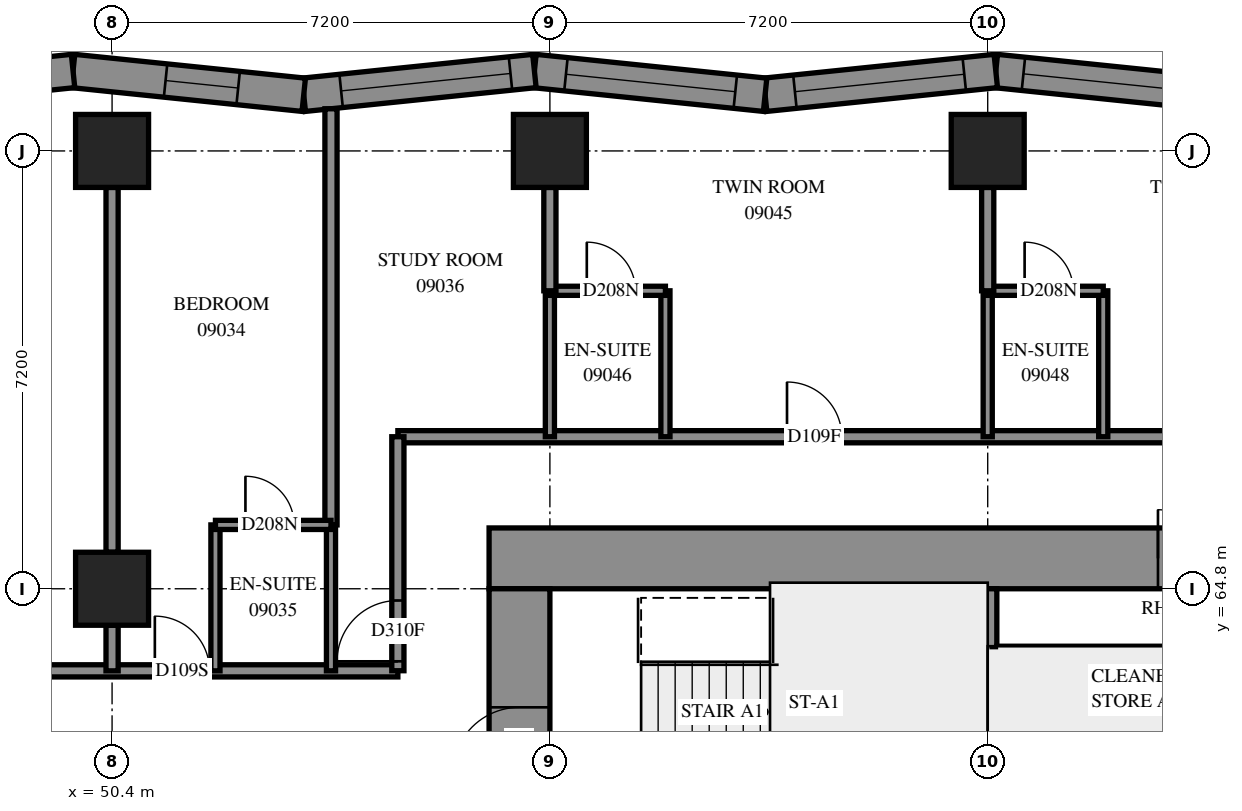
"""IFC4 building model, lengths in metres.
Left out: names, types, materials, properties, quantities, classifications, styles, units other than length and angle.
Written with IfcOpenShell. Run it as: python <this file> out.ifc"""

import sys

from ifc_helpers import new_model, si_unit, direction, frame, frame_2d, origin, origin_2d, place, context, subcontext, project, spatial, polyline, rectangle, outline, extrude, element, fill, save


model = new_model("IFC4")
c1 = context("Model", 3, precision=1e-05, world=origin(), true_north=direction((0.0, 1.0)))
c2 = subcontext(c1, "Body", "Model", "MODEL_VIEW")
j1 = project(units=[si_unit("LENGTHUNIT", "METRE"), si_unit("PLANEANGLEUNIT", "RADIAN")], contexts=[c1])
p1 = place(None, origin())
s1 = spatial("IfcSite", under=j1, at=p1, CompositionType="ELEMENT")
p2 = place(p1, origin())
s2 = spatial("IfcBuilding", under=s1, at=p2, CompositionType="ELEMENT")
p3 = place(p2, frame((0.0, 0.0, 37.2)))
s3 = spatial("IfcBuildingStorey", under=s2, at=p3, CompositionType="ELEMENT", Elevation=37.2)
for number, where, z_axis, x_axis in (
    (1, (50.4, 64.8, 0.0), (0.0, 0.0, 1.0), (1.0, 0.0, 0.0)),
    (2, (50.4, 72.0, 0.0), (0.0, 0.0, 1.0), (1.0, 0.0, 0.0)),
    (3, (57.6, 72.0, 0.0), (0.0, 0.0, 1.0), (1.0, 0.0, 0.0)),
    (4, (64.8, 72.0, 0.0), (0.0, 0.0, 1.0), (1.0, 0.0, 0.0)),
):
    element("IfcColumn", number, at=place(p3, frame(where, z_axis=z_axis, x_axis=x_axis)), inside=s3, PredefinedType="COLUMN", context=c2, shape_type="SweptSolid", body=[
        extrude(rectangle(XDim=1.2, YDim=1.2, at=origin_2d()), origin(), (0.0, 0.0, 1.0), 3.1),
    ])
p4 = place(p3, frame((56.6, 65.3, -0.3), z_axis=(0.0, 0.0, 1.0), x_axis=(1.0, 0.0, 0.0)))
e5 = element("IfcWall", 5, at=p4, inside=s3, PredefinedType="SHEAR", context=c2, shape_type="SweptSolid", body=[
    extrude(rectangle(XDim=16.4, YDim=1.0, at=frame_2d((8.2, 0.0))), origin(), (0.0, 0.0, 1.0), 2.7),
])
p5 = place(p4, frame((11.0, 0.0, 0.3)))
e6 = element("IfcOpeningElement", 6, at=p5, cuts=e5, PredefinedType="OPENING", context=c2, shape_type="SweptSolid", body=[
    extrude(rectangle(XDim=0.8, YDim=2.1, at=frame_2d((0.4, 1.05))), frame((0.0, 0.51, 0.0), z_axis=(0.0, -1.0, 0.0), x_axis=(1.0, 0.0, 0.0)), (0.0, 0.0, 1.0), 1.02),
])
p6 = place(p3, frame((57.1, 50.4, -0.3), z_axis=(0.0, 0.0, 1.0), x_axis=(0.0, 1.0, 0.0)))
e7 = element("IfcWall", 7, at=p6, inside=s3, PredefinedType="SHEAR", context=c2, shape_type="SweptSolid", body=[
    extrude(rectangle(XDim=14.4, YDim=1.0, at=frame_2d((7.2, 0.0))), origin(), (0.0, 0.0, 1.0), 2.7),
])
p7 = place(p6, frame((4.55, 0.0, 0.3)))
e8 = element("IfcOpeningElement", 8, at=p7, cuts=e7, PredefinedType="OPENING", context=c2, shape_type="SweptSolid", body=[
    extrude(rectangle(XDim=1.1, YDim=2.1, at=frame_2d((0.55, 1.05))), frame((0.0, 0.51, 0.0), z_axis=(0.0, -1.0, 0.0), x_axis=(1.0, 0.0, 0.0)), (0.0, 0.0, 1.0), 1.02),
])
p8 = place(p6, frame((11.35, 0.0, 0.3)))
e9 = element("IfcOpeningElement", 9, at=p8, cuts=e7, PredefinedType="OPENING", context=c2, shape_type="SweptSolid", body=[
    extrude(rectangle(XDim=1.1, YDim=2.1, at=frame_2d((0.55, 1.05))), frame((0.0, 0.51, 0.0), z_axis=(0.0, -1.0, 0.0), x_axis=(1.0, 0.0, 0.0)), (0.0, 0.0, 1.0), 1.02),
])
p9 = place(p3, frame((64.8, 60.6, 0.0), z_axis=(0.0, 0.0, 1.0), x_axis=(0.0, 1.0, 0.0)))
e10 = element("IfcWall", 10, at=p9, inside=s3, PredefinedType="SOLIDWALL", context=c2, shape_type="SweptSolid", body=[
    extrude(rectangle(XDim=4.2, YDim=0.3, at=frame_2d((2.1, 0.0))), origin(), (0.0, 0.0, 1.0), 3.1),
])
p10 = place(p3, frame((68.727, 72.924, 0.0), z_axis=(0.0, 0.0, 1.0), x_axis=(-0.9947306832, 0.1025225234, 0.0)))
e11 = element("IfcWall", 11, at=p10, inside=s3, PredefinedType="SOLIDWALL", context=c2, shape_type="SweptSolid", body=[
    extrude(outline(polyline([(0.028, -0.275), (3.842, -0.275), (3.785, 0.275), (-0.028, 0.275), (0.028, -0.275)])), origin(), (0.0, 0.0, 1.0), 3.1),
])
p11 = place(p10, frame((0.557, 0.0, 0.5)))
e12 = element("IfcOpeningElement", 12, at=p11, cuts=e11, PredefinedType="OPENING", context=c2, shape_type="SweptSolid", body=[
    extrude(rectangle(XDim=2.8, YDim=2.45, at=frame_2d((1.4, 1.225))), frame((0.0, 0.285, 0.0), z_axis=(0.0, -1.0, 0.0), x_axis=(1.0, 0.0, 0.0)), (0.0, 0.0, 1.0), 0.57),
])
p12 = place(p3, frame((64.933, 73.314, 0.0), z_axis=(0.0, 0.0, 1.0), x_axis=(-0.9947304076, -0.1025251975, 0.0)))
e13 = element("IfcWall", 13, at=p12, inside=s3, PredefinedType="SOLIDWALL", context=c2, shape_type="SweptSolid", body=[
    extrude(outline(polyline([(-0.028, -0.275), (3.785, -0.275), (3.842, 0.275), (0.028, 0.275), (-0.028, -0.275)])), origin(), (0.0, 0.0, 1.0), 3.1),
])
p13 = place(p12, frame((0.521, 0.0, 0.5)))
e14 = element("IfcOpeningElement", 14, at=p13, cuts=e13, PredefinedType="OPENING", context=c2, shape_type="SweptSolid", body=[
    extrude(rectangle(XDim=2.8, YDim=2.45, at=frame_2d((1.4, 1.225))), frame((0.0, 0.285, 0.0), z_axis=(0.0, -1.0, 0.0), x_axis=(1.0, 0.0, 0.0)), (0.0, 0.0, 1.0), 0.57),
])
p14 = place(p3, frame((61.139, 72.924, 0.0), z_axis=(0.0, 0.0, 1.0), x_axis=(-0.9947306832, 0.1025225234, 0.0)))
e15 = element("IfcWall", 15, at=p14, inside=s3, PredefinedType="SOLIDWALL", context=c2, shape_type="SweptSolid", body=[
    extrude(outline(polyline([(0.028, -0.275), (3.842, -0.275), (3.785, 0.275), (-0.028, 0.275), (0.028, -0.275)])), origin(), (0.0, 0.0, 1.0), 3.1),
])
p15 = place(p14, frame((0.493, 0.0, 0.5)))
e16 = element("IfcOpeningElement", 16, at=p15, cuts=e15, PredefinedType="OPENING", context=c2, shape_type="SweptSolid", body=[
    extrude(rectangle(XDim=2.8, YDim=2.45, at=frame_2d((1.4, 1.225))), frame((0.0, 0.285, 0.0), z_axis=(0.0, -1.0, 0.0), x_axis=(1.0, 0.0, 0.0)), (0.0, 0.0, 1.0), 0.57),
])
p16 = place(p3, frame((57.346, 73.314, 0.0), z_axis=(0.0, 0.0, 1.0), x_axis=(-0.9947304076, -0.1025251975, 0.0)))
e17 = element("IfcWall", 17, at=p16, inside=s3, PredefinedType="SOLIDWALL", context=c2, shape_type="SweptSolid", body=[
    extrude(outline(polyline([(-0.028, -0.275), (3.785, -0.275), (3.842, 0.275), (0.028, 0.275), (-0.028, -0.275)])), origin(), (0.0, 0.0, 1.0), 3.1),
])
p17 = place(p16, frame((0.396, 0.0, 0.5)))
e18 = element("IfcOpeningElement", 18, at=p17, cuts=e17, PredefinedType="OPENING", context=c2, shape_type="SweptSolid", body=[
    extrude(rectangle(XDim=2.8, YDim=2.45, at=frame_2d((1.4, 1.225))), frame((0.0, 0.285, 0.0), z_axis=(0.0, -1.0, 0.0), x_axis=(1.0, 0.0, 0.0)), (0.0, 0.0, 1.0), 0.57),
])
p18 = place(p3, frame((53.552, 72.924, 0.0), z_axis=(0.0, 0.0, 1.0), x_axis=(-0.9947306832, 0.1025225234, 0.0)))
e19 = element("IfcWall", 19, at=p18, inside=s3, PredefinedType="SOLIDWALL", context=c2, shape_type="SweptSolid", body=[
    extrude(outline(polyline([(0.028, -0.275), (3.842, -0.275), (3.785, 0.275), (-0.028, 0.275), (0.028, -0.275)])), origin(), (0.0, 0.0, 1.0), 3.1),
])
p19 = place(p18, frame((1.084, 0.0, 0.5)))
e20 = element("IfcOpeningElement", 20, at=p19, cuts=e19, PredefinedType="OPENING", context=c2, shape_type="SweptSolid", body=[
    extrude(rectangle(XDim=1.2, YDim=2.45, at=frame_2d((0.6, 1.225))), frame((0.0, 0.285, 0.0), z_axis=(0.0, -1.0, 0.0), x_axis=(1.0, 0.0, 0.0)), (0.0, 0.0, 1.0), 0.57),
])
p20 = place(p3, frame((49.758, 73.314, 0.0), z_axis=(0.0, 0.0, 1.0), x_axis=(-0.9947306832, -0.1025225234, 0.0)))
e21 = element("IfcWall", 21, at=p20, inside=s3, PredefinedType="SOLIDWALL", context=c2, shape_type="SweptSolid", body=[
    extrude(outline(polyline([(-0.028, -0.275), (3.785, -0.275), (3.842, 0.275), (0.028, 0.275), (-0.028, -0.275)])), origin(), (0.0, 0.0, 1.0), 3.1),
])
p21 = place(p20, frame((1.001, 0.0, 0.5)))
e22 = element("IfcOpeningElement", 22, at=p21, cuts=e21, PredefinedType="OPENING", context=c2, shape_type="SweptSolid", body=[
    extrude(rectangle(XDim=1.2, YDim=2.45, at=frame_2d((0.6, 1.225))), frame((0.0, 0.285, 0.0), z_axis=(0.0, -1.0, 0.0), x_axis=(1.0, 0.0, 0.0)), (0.0, 0.0, 1.0), 0.57),
])
p22 = place(p3, frame((64.95, 63.78, 0.0), z_axis=(0.0, 0.0, 1.0), x_axis=(1.0, 0.0, 0.0)))
e23 = element("IfcWall", 23, at=p22, inside=s3, PredefinedType="PARTITIONING", context=c2, shape_type="SweptSolid", body=[
    extrude(rectangle(XDim=5.95, YDim=0.15, at=frame_2d((2.975, 0.0))), origin(), (0.0, 0.0, 1.0), 3.1),
])
p23 = place(p3, frame((33.452, 63.45, 0.0), z_axis=(0.0, 0.0, 1.0), x_axis=(1.0, 0.0, 0.0)))
e24 = element("IfcWall", 24, at=p23, inside=s3, PredefinedType="PARTITIONING", context=c2, shape_type="SweptSolid", body=[
    extrude(rectangle(XDim=21.648, YDim=0.2, at=frame_2d((10.824, 0.0))), origin(), (0.0, 0.0, 1.0), 3.1),
])
p24 = place(p23, frame((0.142, 0.0, 0.0)))
e25 = element("IfcOpeningElement", 25, at=p24, cuts=e24, PredefinedType="OPENING", context=c2, shape_type="SweptSolid", body=[
    extrude(rectangle(XDim=1.0, YDim=2.1, at=frame_2d((0.5, 1.05))), frame((0.0, 0.11, 0.0), z_axis=(0.0, -1.0, 0.0), x_axis=(1.0, 0.0, 0.0)), (0.0, 0.0, 1.0), 0.22),
])
p25 = place(p23, frame((6.412, 0.0, 0.0)))
e26 = element("IfcOpeningElement", 26, at=p25, cuts=e24, PredefinedType="OPENING", context=c2, shape_type="SweptSolid", body=[
    extrude(rectangle(XDim=0.9, YDim=2.1, at=frame_2d((0.45, 1.05))), frame((0.0, 0.11, 0.0), z_axis=(0.0, -1.0, 0.0), x_axis=(1.0, 0.0, 0.0)), (0.0, 0.0, 1.0), 0.22),
])
p26 = place(p23, frame((14.168, 0.0, 0.0)))
e27 = element("IfcOpeningElement", 27, at=p26, cuts=e24, PredefinedType="OPENING", context=c2, shape_type="SweptSolid", body=[
    extrude(rectangle(XDim=0.9, YDim=2.1, at=frame_2d((0.45, 1.05))), frame((0.0, 0.11, 0.0), z_axis=(0.0, -1.0, 0.0), x_axis=(1.0, 0.0, 0.0)), (0.0, 0.0, 1.0), 0.22),
])
p27 = place(p23, frame((17.651, 0.0, 0.0)))
e28 = element("IfcOpeningElement", 28, at=p27, cuts=e24, PredefinedType="OPENING", context=c2, shape_type="SweptSolid", body=[
    extrude(rectangle(XDim=0.9, YDim=2.1, at=frame_2d((0.45, 1.05))), frame((0.0, 0.11, 0.0), z_axis=(0.0, -1.0, 0.0), x_axis=(1.0, 0.0, 0.0)), (0.0, 0.0, 1.0), 0.22),
])
p28 = place(p3, frame((55.1, 67.3, 0.0), z_axis=(0.0, 0.0, 1.0), x_axis=(1.0, 0.0, 0.0)))
e29 = element("IfcWall", 29, at=p28, inside=s3, PredefinedType="PARTITIONING", context=c2, shape_type="SweptSolid", body=[
    extrude(rectangle(XDim=19.4, YDim=0.2, at=frame_2d((9.7, 0.0))), origin(), (0.0, 0.0, 1.0), 3.1),
])
p29 = place(p28, frame((6.399, 0.0, 0.0)))
e30 = element("IfcOpeningElement", 30, at=p29, cuts=e29, PredefinedType="OPENING", context=c2, shape_type="SweptSolid", body=[
    extrude(rectangle(XDim=0.9, YDim=2.1, at=frame_2d((0.45, 1.05))), frame((0.0, 0.11, 0.0), z_axis=(0.0, -1.0, 0.0), x_axis=(1.0, 0.0, 0.0)), (0.0, 0.0, 1.0), 0.22),
])
p30 = place(p28, frame((13.599, 0.0, 0.0)))
e31 = element("IfcOpeningElement", 31, at=p30, cuts=e29, PredefinedType="OPENING", context=c2, shape_type="SweptSolid", body=[
    extrude(rectangle(XDim=0.9, YDim=2.1, at=frame_2d((0.45, 1.05))), frame((0.0, 0.11, 0.0), z_axis=(0.0, -1.0, 0.0), x_axis=(1.0, 0.0, 0.0)), (0.0, 0.0, 1.0), 0.22),
])
p31 = place(p3, frame((54.0, 65.85, 0.0), z_axis=(0.0, 0.0, 1.0), x_axis=(0.0, 1.0, 0.0)))
e32 = element("IfcWall", 32, at=p31, inside=s3, PredefinedType="PARTITIONING", context=c2, shape_type="SweptSolid", body=[
    extrude(rectangle(XDim=6.843, YDim=0.2, at=frame_2d((3.422, 0.0))), origin(), (0.0, 0.0, 1.0), 3.1),
])
p32 = place(p3, frame((50.4, 65.4, 0.0), z_axis=(0.0, 0.0, 1.0), x_axis=(0.0, 1.0, 0.0)))
e33 = element("IfcWall", 33, at=p32, inside=s3, PredefinedType="PARTITIONING", context=c2, shape_type="SweptSolid", body=[
    extrude(rectangle(XDim=6.0, YDim=0.2, at=frame_2d((3.0, 0.0))), origin(), (0.0, 0.0, 1.0), 3.1),
])
p33 = place(p3, frame((55.1, 63.452, 0.0), z_axis=(0.0, 0.0, 1.0), x_axis=(0.0, 1.0, 0.0)))
e34 = element("IfcWall", 34, at=p33, inside=s3, PredefinedType="PARTITIONING", context=c2, shape_type="SweptSolid", body=[
    extrude(rectangle(XDim=3.848, YDim=0.2, at=frame_2d((1.924, 0.0))), origin(), (0.0, 0.0, 1.0), 3.1),
])
p34 = place(p33, frame((0.155, 0.0, 0.0)))
e35 = element("IfcOpeningElement", 35, at=p34, cuts=e34, PredefinedType="OPENING", context=c2, shape_type="SweptSolid", body=[
    extrude(rectangle(XDim=1.0, YDim=2.1, at=frame_2d((0.5, 1.05))), frame((0.0, 0.11, 0.0), z_axis=(0.0, -1.0, 0.0), x_axis=(1.0, 0.0, 0.0)), (0.0, 0.0, 1.0), 0.22),
])
for number, where, z_axis, x_axis in (
    (36, (59.5, 67.3, 0.0), (0.0, 0.0, 1.0), (0.0, 1.0, 0.0)),
    (37, (57.6, 67.3, 0.0), (0.0, 0.0, 1.0), (0.0, 1.0, 0.0)),
    (38, (66.7, 67.3, 0.0), (0.0, 0.0, 1.0), (0.0, 1.0, 0.0)),
    (39, (64.8, 67.3, 0.0), (0.0, 0.0, 1.0), (0.0, 1.0, 0.0)),
    (40, (52.1, 63.45, 0.0), (0.0, 0.0, 1.0), (0.0, 1.0, 0.0)),
    (41, (54.0, 63.45, 0.0), (0.0, 0.0, 1.0), (0.0, 1.0, 0.0)),
):
    element("IfcWall", number, at=place(p3, frame(where, z_axis=z_axis, x_axis=x_axis)), inside=s3, PredefinedType="PARTITIONING", context=c2, shape_type="SweptSolid", body=[
        extrude(rectangle(XDim=2.4, YDim=0.15, at=frame_2d((1.2, 0.0))), origin(), (0.0, 0.0, 1.0), 3.1),
    ])
p35 = place(p3, frame((64.8, 69.7, 0.0), z_axis=(0.0, 0.0, 1.0), x_axis=(1.0, 0.0, 0.0)))
e42 = element("IfcWall", 42, at=p35, inside=s3, PredefinedType="PARTITIONING", context=c2, shape_type="SweptSolid", body=[
    extrude(rectangle(XDim=1.9, YDim=0.15, at=frame_2d((0.95, 0.0))), origin(), (0.0, 0.0, 1.0), 3.1),
])
p36 = place(p35, frame((0.607, 0.0, 0.0)))
e43 = element("IfcOpeningElement", 43, at=p36, cuts=e42, PredefinedType="OPENING", context=c2, shape_type="SweptSolid", body=[
    extrude(rectangle(XDim=0.8, YDim=2.1, at=frame_2d((0.4, 1.05))), frame((0.0, 0.085, 0.0), z_axis=(0.0, -1.0, 0.0), x_axis=(1.0, 0.0, 0.0)), (0.0, 0.0, 1.0), 0.17),
])
p37 = place(p3, frame((52.1, 65.85, 0.0), z_axis=(0.0, 0.0, 1.0), x_axis=(1.0, 0.0, 0.0)))
e44 = element("IfcWall", 44, at=p37, inside=s3, PredefinedType="PARTITIONING", context=c2, shape_type="SweptSolid", body=[
    extrude(rectangle(XDim=1.9, YDim=0.15, at=frame_2d((0.95, 0.0))), origin(), (0.0, 0.0, 1.0), 3.1),
])
p38 = place(p37, frame((0.493, 0.0, 0.0)))
e45 = element("IfcOpeningElement", 45, at=p38, cuts=e44, PredefinedType="OPENING", context=c2, shape_type="SweptSolid", body=[
    extrude(rectangle(XDim=0.8, YDim=2.1, at=frame_2d((0.4, 1.05))), frame((0.0, 0.085, 0.0), z_axis=(0.0, -1.0, 0.0), x_axis=(1.0, 0.0, 0.0)), (0.0, 0.0, 1.0), 0.17),
])
p39 = place(p3, frame((57.6, 69.7, 0.0), z_axis=(0.0, 0.0, 1.0), x_axis=(1.0, 0.0, 0.0)))
e46 = element("IfcWall", 46, at=p39, inside=s3, PredefinedType="PARTITIONING", context=c2, shape_type="SweptSolid", body=[
    extrude(rectangle(XDim=1.9, YDim=0.15, at=frame_2d((0.95, 0.0))), origin(), (0.0, 0.0, 1.0), 3.1),
])
p40 = place(p39, frame((0.607, 0.0, 0.0)))
e47 = element("IfcOpeningElement", 47, at=p40, cuts=e46, PredefinedType="OPENING", context=c2, shape_type="SweptSolid", body=[
    extrude(rectangle(XDim=0.8, YDim=2.1, at=frame_2d((0.4, 1.05))), frame((0.0, 0.085, 0.0), z_axis=(0.0, -1.0, 0.0), x_axis=(1.0, 0.0, 0.0)), (0.0, 0.0, 1.0), 0.17),
])
for number, where, z_axis, x_axis in (
    (48, (57.6, 69.7, 0.0), (0.0, 0.0, 1.0), (0.0, 1.0, 0.0)),
    (49, (64.8, 69.7, 0.0), (0.0, 0.0, 1.0), (0.0, 1.0, 0.0)),
):
    element("IfcWall", number, at=place(p3, frame(where, z_axis=z_axis, x_axis=x_axis)), inside=s3, PredefinedType="PARTITIONING", context=c2, shape_type="SweptSolid", body=[
        extrude(rectangle(XDim=1.7, YDim=0.2, at=frame_2d((0.85, 0.0))), origin(), (0.0, 0.0, 1.0), 3.1),
    ])
p41 = place(p3, frame((50.4, 63.45, 0.0), z_axis=(0.0, 0.0, 1.0), x_axis=(0.0, 1.0, 0.0)))
e50 = element("IfcWall", 50, at=p41, inside=s3, PredefinedType="PARTITIONING", context=c2, shape_type="SweptSolid", body=[
    extrude(rectangle(XDim=0.75, YDim=0.2, at=frame_2d((0.375, 0.0))), origin(), (0.0, 0.0, 1.0), 3.1),
])
p42 = place(p11, origin())
e51 = element("IfcWindow", 51, at=p42, inside=s3, PartitioningType="SINGLE_PANEL", PredefinedType="WINDOW", context=c2, shape_type="SweptSolid", body=[
    extrude(rectangle(XDim=2.8, YDim=2.45, at=frame_2d((1.4, 1.225))), frame((0.0, 0.155, 0.0), z_axis=(0.0, -1.0, 0.0), x_axis=(1.0, 0.0, 0.0)), (0.0, 0.0, 1.0), 0.06),
])
fill(e12, e51)
p43 = place(p13, origin())
e52 = element("IfcWindow", 52, at=p43, inside=s3, PartitioningType="SINGLE_PANEL", PredefinedType="WINDOW", context=c2, shape_type="SweptSolid", body=[
    extrude(rectangle(XDim=2.8, YDim=2.45, at=frame_2d((1.4, 1.225))), frame((0.0, 0.155, 0.0), z_axis=(0.0, -1.0, 0.0), x_axis=(1.0, 0.0, 0.0)), (0.0, 0.0, 1.0), 0.06),
])
fill(e14, e52)
p44 = place(p15, origin())
e53 = element("IfcWindow", 53, at=p44, inside=s3, PartitioningType="SINGLE_PANEL", PredefinedType="WINDOW", context=c2, shape_type="SweptSolid", body=[
    extrude(rectangle(XDim=2.8, YDim=2.45, at=frame_2d((1.4, 1.225))), frame((0.0, 0.155, 0.0), z_axis=(0.0, -1.0, 0.0), x_axis=(1.0, 0.0, 0.0)), (0.0, 0.0, 1.0), 0.06),
])
fill(e16, e53)
p45 = place(p17, origin())
e54 = element("IfcWindow", 54, at=p45, inside=s3, PartitioningType="SINGLE_PANEL", PredefinedType="WINDOW", context=c2, shape_type="SweptSolid", body=[
    extrude(rectangle(XDim=2.8, YDim=2.45, at=frame_2d((1.4, 1.225))), frame((0.0, 0.155, 0.0), z_axis=(0.0, -1.0, 0.0), x_axis=(1.0, 0.0, 0.0)), (0.0, 0.0, 1.0), 0.06),
])
fill(e18, e54)
p46 = place(p19, origin())
e55 = element("IfcWindow", 55, at=p46, inside=s3, PartitioningType="SINGLE_PANEL", PredefinedType="WINDOW", context=c2, shape_type="SweptSolid", body=[
    extrude(rectangle(XDim=1.2, YDim=2.45, at=frame_2d((0.6, 1.225))), frame((0.0, 0.155, 0.0), z_axis=(0.0, -1.0, 0.0), x_axis=(1.0, 0.0, 0.0)), (0.0, 0.0, 1.0), 0.06),
])
fill(e20, e55)
p47 = place(p5, origin())
e56 = element("IfcDoor", 56, at=p47, inside=s3, OperationType="SINGLE_SWING_RIGHT", PredefinedType="DOOR", context=c2, shape_type="SweptSolid", body=[
    extrude(rectangle(XDim=0.8, YDim=2.1, at=frame_2d((0.4, 1.05))), frame((0.0, -0.44, 0.0), z_axis=(0.0, -1.0, 0.0), x_axis=(1.0, 0.0, 0.0)), (0.0, 0.0, 1.0), 0.05),
])
fill(e6, e56)
p48 = place(p8, origin())
e57 = element("IfcDoor", 57, at=p48, inside=s3, OperationType="SINGLE_SWING_LEFT", PredefinedType="DOOR", context=c2, shape_type="SweptSolid", body=[
    extrude(rectangle(XDim=1.1, YDim=2.1, at=frame_2d((0.55, 1.05))), frame((0.0, 0.025, 0.0), z_axis=(0.0, -1.0, 0.0), x_axis=(1.0, 0.0, 0.0)), (0.0, 0.0, 1.0), 0.05),
])
fill(e9, e57)
p49 = place(p27, origin())
e58 = element("IfcDoor", 58, at=p49, inside=s3, OperationType="SINGLE_SWING_RIGHT", PredefinedType="DOOR", context=c2, shape_type="SweptSolid", body=[
    extrude(rectangle(XDim=0.9, YDim=2.1, at=frame_2d((0.45, 1.05))), frame((0.0, 0.025, 0.0), z_axis=(0.0, -1.0, 0.0), x_axis=(1.0, 0.0, 0.0)), (0.0, 0.0, 1.0), 0.05),
])
fill(e28, e58)
p50 = place(p38, origin())
e59 = element("IfcDoor", 59, at=p50, inside=s3, OperationType="SINGLE_SWING_RIGHT", PredefinedType="DOOR", context=c2, shape_type="SweptSolid", body=[
    extrude(rectangle(XDim=0.8, YDim=2.1, at=frame_2d((0.4, 1.05))), frame((0.0, 0.025, 0.0), z_axis=(0.0, -1.0, 0.0), x_axis=(1.0, 0.0, 0.0)), (0.0, 0.0, 1.0), 0.05),
])
fill(e45, e59)
p51 = place(p34, origin())
e60 = element("IfcDoor", 60, at=p51, inside=s3, OperationType="SINGLE_SWING_LEFT", PredefinedType="DOOR", context=c2, shape_type="SweptSolid", body=[
    extrude(rectangle(XDim=1.0, YDim=2.1, at=frame_2d((0.5, 1.05))), frame((0.0, 0.025, 0.0), z_axis=(0.0, -1.0, 0.0), x_axis=(1.0, 0.0, 0.0)), (0.0, 0.0, 1.0), 0.05),
])
fill(e35, e60)
p52 = place(p29, origin())
e61 = element("IfcDoor", 61, at=p52, inside=s3, OperationType="SINGLE_SWING_RIGHT", PredefinedType="DOOR", context=c2, shape_type="SweptSolid", body=[
    extrude(rectangle(XDim=0.9, YDim=2.1, at=frame_2d((0.45, 1.05))), frame((0.0, 0.025, 0.0), z_axis=(0.0, -1.0, 0.0), x_axis=(1.0, 0.0, 0.0)), (0.0, 0.0, 1.0), 0.05),
])
fill(e30, e61)
p53 = place(p40, origin())
e62 = element("IfcDoor", 62, at=p53, inside=s3, OperationType="SINGLE_SWING_RIGHT", PredefinedType="DOOR", context=c2, shape_type="SweptSolid", body=[
    extrude(rectangle(XDim=0.8, YDim=2.1, at=frame_2d((0.4, 1.05))), frame((0.0, 0.025, 0.0), z_axis=(0.0, -1.0, 0.0), x_axis=(1.0, 0.0, 0.0)), (0.0, 0.0, 1.0), 0.05),
])
fill(e47, e62)
p54 = place(p36, origin())
e63 = element("IfcDoor", 63, at=p54, inside=s3, OperationType="SINGLE_SWING_RIGHT", PredefinedType="DOOR", context=c2, shape_type="SweptSolid", body=[
    extrude(rectangle(XDim=0.8, YDim=2.1, at=frame_2d((0.4, 1.05))), frame((0.0, 0.025, 0.0), z_axis=(0.0, -1.0, 0.0), x_axis=(1.0, 0.0, 0.0)), (0.0, 0.0, 1.0), 0.05),
])
fill(e43, e63)
save(model, sys.argv[1])
